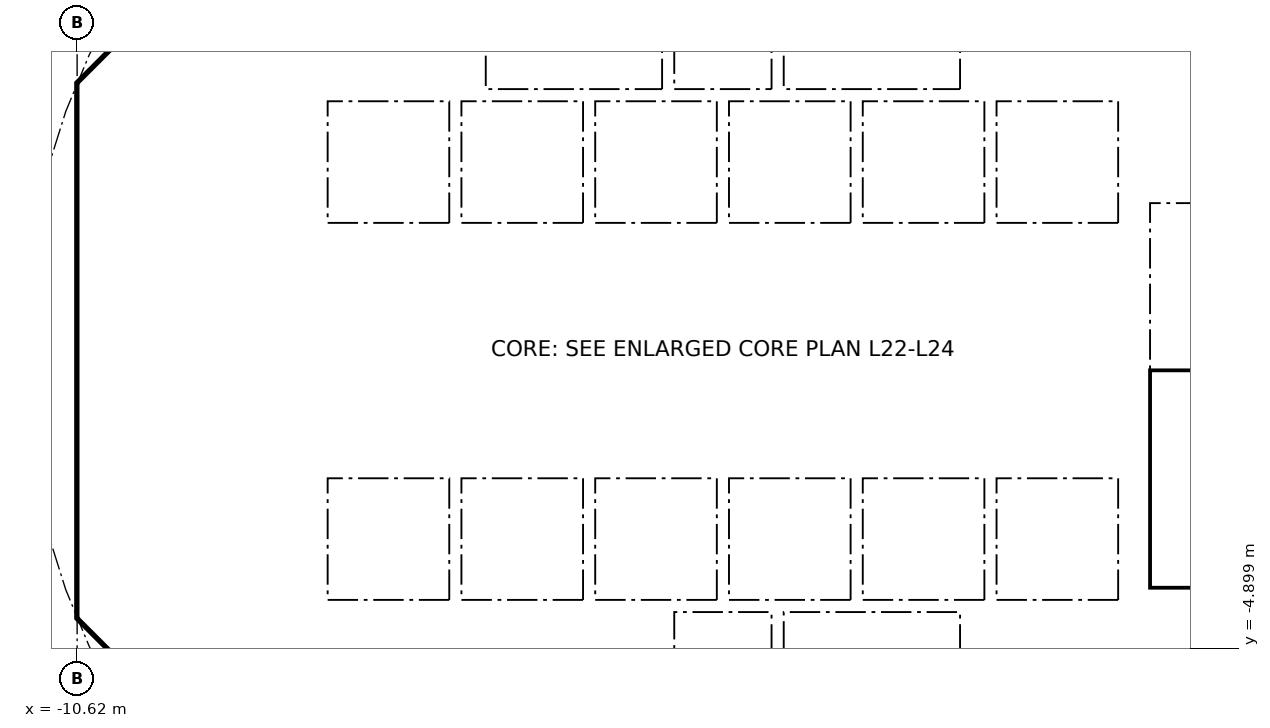
"""IFC4 building model, lengths in metres.
Left out: names, types, materials, properties, quantities, classifications, styles, units other than length and angle.
Written with IfcOpenShell. Run it as: python <this file> out.ifc"""

import sys

from ifc_helpers import new_model, si_unit, direction, frame, frame_2d, origin, place, context, subcontext, project, spatial, polyline, rectangle, outline, extrude, element, fill, save


model = new_model("IFC4")
c1 = context("Model", 3, precision=1e-05, world=origin(), true_north=direction((0.0, 1.0)))
c2 = subcontext(c1, "Body", "Model", "MODEL_VIEW")
j1 = project(units=[si_unit("LENGTHUNIT", "METRE"), si_unit("PLANEANGLEUNIT", "RADIAN")], contexts=[c1])
p1 = place(None, origin())
s1 = spatial("IfcSite", under=j1, at=p1, CompositionType="ELEMENT")
p2 = place(p1, origin())
s2 = spatial("IfcBuilding", under=s1, at=p2, CompositionType="ELEMENT")
p3 = place(p2, frame((0.0, 0.0, 95.5)))
s3 = spatial("IfcBuildingStorey", under=s2, at=p3, CompositionType="ELEMENT", Elevation=95.5)
p4 = place(p3, frame((9.988, 4.613, 0.0), z_axis=(0.0, 0.0, 1.0), x_axis=(-0.707106781187, 0.707106781187, 0.0)))
e1 = element("IfcWall", 1, at=p4, inside=s3, PredefinedType="SHEAR", context=c2, shape_type="SweptSolid", body=[
    extrude(rectangle(XDim=7.602, YDim=0.6, at=frame_2d((3.801, 0.0))), origin(), (0.0, 0.0, 1.0), 3.44),
])
p5 = place(p4, frame((3.201, 0.0, 0.0)))
e2 = element("IfcOpeningElement", 2, at=p5, cuts=e1, PredefinedType="OPENING", context=c2, shape_type="SweptSolid", body=[
    extrude(rectangle(XDim=1.2, YDim=2.1, at=frame_2d((0.6, 1.05))), frame((0.0, 0.31, 0.0), z_axis=(0.0, -1.0, 0.0), x_axis=(1.0, 0.0, 0.0)), (0.0, 0.0, 1.0), 0.62),
])
p6 = place(p3, frame((-4.613, 9.988, 0.0), z_axis=(0.0, 0.0, 1.0), x_axis=(-0.707106781187, -0.707106781187, 0.0)))
e3 = element("IfcWall", 3, at=p6, inside=s3, PredefinedType="SHEAR", context=c2, shape_type="SweptSolid", body=[
    extrude(rectangle(XDim=7.602, YDim=0.6, at=frame_2d((3.801, 0.0))), origin(), (0.0, 0.0, 1.0), 3.44),
])
p7 = place(p6, frame((0.351, 0.0, 0.0)))
e4 = element("IfcOpeningElement", 4, at=p7, cuts=e3, PredefinedType="OPENING", context=c2, shape_type="SweptSolid", body=[
    extrude(rectangle(XDim=1.1, YDim=2.1, at=frame_2d((0.55, 1.05))), frame((0.0, 0.31, 0.0), z_axis=(0.0, -1.0, 0.0), x_axis=(1.0, 0.0, 0.0)), (0.0, 0.0, 1.0), 0.62),
])
p8 = place(p3, frame((-10.325, 3.801, 0.0), z_axis=(0.0, 0.0, 1.0), x_axis=(0.0, -1.0, 0.0)))
e5 = element("IfcWall", 5, at=p8, inside=s3, PredefinedType="SHEAR", context=c2, shape_type="SweptSolid", body=[
    extrude(rectangle(XDim=7.602, YDim=0.6, at=frame_2d((3.801, 0.0))), origin(), (0.0, 0.0, 1.0), 3.44),
])
p9 = place(p8, frame((0.651, 0.0, 0.0)))
e6 = element("IfcOpeningElement", 6, at=p9, cuts=e5, PredefinedType="OPENING", context=c2, shape_type="SweptSolid", body=[
    extrude(rectangle(XDim=1.5, YDim=2.1, at=frame_2d((0.75, 1.05))), frame((0.0, 0.31, 0.0), z_axis=(0.0, -1.0, 0.0), x_axis=(1.0, 0.0, 0.0)), (0.0, 0.0, 1.0), 0.62),
])
p10 = place(p8, frame((5.451, 0.0, 0.0)))
e7 = element("IfcOpeningElement", 7, at=p10, cuts=e5, PredefinedType="OPENING", context=c2, shape_type="SweptSolid", body=[
    extrude(rectangle(XDim=1.5, YDim=2.1, at=frame_2d((0.75, 1.05))), frame((0.0, 0.31, 0.0), z_axis=(0.0, -1.0, 0.0), x_axis=(1.0, 0.0, 0.0)), (0.0, 0.0, 1.0), 0.62),
])
p11 = place(p3, frame((-9.988, -4.613, 0.0), z_axis=(0.0, 0.0, 1.0), x_axis=(0.707106781187, -0.707106781187, 0.0)))
e8 = element("IfcWall", 8, at=p11, inside=s3, PredefinedType="SHEAR", context=c2, shape_type="SweptSolid", body=[
    extrude(rectangle(XDim=7.602, YDim=0.6, at=frame_2d((3.801, 0.0))), origin(), (0.0, 0.0, 1.0), 3.44),
])
p12 = place(p11, frame((6.151, 0.0, 0.0)))
e9 = element("IfcOpeningElement", 9, at=p12, cuts=e8, PredefinedType="OPENING", context=c2, shape_type="SweptSolid", body=[
    extrude(rectangle(XDim=1.1, YDim=2.1, at=frame_2d((0.55, 1.05))), frame((0.0, 0.31, 0.0), z_axis=(0.0, -1.0, 0.0), x_axis=(1.0, 0.0, 0.0)), (0.0, 0.0, 1.0), 0.62),
])
p13 = place(p3, frame((4.613, -9.988, 0.0), z_axis=(0.0, 0.0, 1.0), x_axis=(0.707106781187, 0.707106781187, 0.0)))
e10 = element("IfcWall", 10, at=p13, inside=s3, PredefinedType="SHEAR", context=c2, shape_type="SweptSolid", body=[
    extrude(rectangle(XDim=7.602, YDim=0.6, at=frame_2d((3.801, 0.0))), origin(), (0.0, 0.0, 1.0), 3.44),
])
p14 = place(p13, frame((3.201, 0.0, 0.0)))
e11 = element("IfcOpeningElement", 11, at=p14, cuts=e10, PredefinedType="OPENING", context=c2, shape_type="SweptSolid", body=[
    extrude(rectangle(XDim=1.2, YDim=2.1, at=frame_2d((0.6, 1.05))), frame((0.0, 0.31, 0.0), z_axis=(0.0, -1.0, 0.0), x_axis=(1.0, 0.0, 0.0)), (0.0, 0.0, 1.0), 0.62),
])
p15 = place(p3, frame((-7.0, 4.1, 0.0), z_axis=(0.0, 0.0, 1.0), x_axis=(0.0, 1.0, 0.0)))
e12 = element("IfcWall", 12, at=p15, inside=s3, PredefinedType="PARTITIONING", context=c2, shape_type="SweptSolid", body=[
    extrude(rectangle(XDim=2.927, YDim=0.15, at=frame_2d((1.463, 0.0))), origin(), (0.0, 0.0, 1.0), 3.44),
])
p16 = place(p15, frame((1.051, 0.0, 0.0)))
e13 = element("IfcOpeningElement", 13, at=p16, cuts=e12, PredefinedType="OPENING", context=c2, shape_type="SweptSolid", body=[
    extrude(rectangle(XDim=0.9, YDim=2.1, at=frame_2d((0.45, 1.05))), frame((0.0, 0.085, 0.0), z_axis=(0.0, -1.0, 0.0), x_axis=(1.0, 0.0, 0.0)), (0.0, 0.0, 1.0), 0.17),
])
p17 = place(p3, frame((4.0, 4.3, 0.0), z_axis=(0.0, 0.0, 1.0), x_axis=(0.0, 1.0, 0.0)))
e14 = element("IfcWall", 14, at=p17, inside=s3, PredefinedType="SOLIDWALL", context=c2, shape_type="SweptSolid", body=[
    extrude(rectangle(XDim=2.2, YDim=0.2, at=frame_2d((1.1, 0.0))), origin(), (0.0, 0.0, 1.0), 3.44),
])
p18 = place(p17, frame((0.55, 0.0, 0.0)))
e15 = element("IfcOpeningElement", 15, at=p18, cuts=e14, PredefinedType="OPENING", context=c2, shape_type="SweptSolid", body=[
    extrude(rectangle(XDim=1.1, YDim=2.1, at=frame_2d((0.55, 1.05))), frame((0.0, 0.11, 0.0), z_axis=(0.0, -1.0, 0.0), x_axis=(1.0, 0.0, 0.0)), (0.0, 0.0, 1.0), 0.22),
])
p19 = place(p3, frame((-4.0, 4.3, 0.0), z_axis=(0.0, 0.0, 1.0), x_axis=(0.0, 1.0, 0.0)))
e16 = element("IfcWall", 16, at=p19, inside=s3, PredefinedType="SOLIDWALL", context=c2, shape_type="SweptSolid", body=[
    extrude(rectangle(XDim=2.2, YDim=0.2, at=frame_2d((1.1, 0.0))), origin(), (0.0, 0.0, 1.0), 3.44),
])
p20 = place(p19, frame((0.55, 0.0, 0.0)))
e17 = element("IfcOpeningElement", 17, at=p20, cuts=e16, PredefinedType="OPENING", context=c2, shape_type="SweptSolid", body=[
    extrude(rectangle(XDim=1.1, YDim=2.1, at=frame_2d((0.55, 1.05))), frame((0.0, 0.11, 0.0), z_axis=(0.0, -1.0, 0.0), x_axis=(1.0, 0.0, 0.0)), (0.0, 0.0, 1.0), 0.22),
])
p21 = place(p3, frame((-6.7, 2.0, 0.0), z_axis=(0.0, 0.0, 1.0), x_axis=(1.0, 0.0, 0.0)))
e18 = element("IfcWall", 18, at=p21, inside=s3, PredefinedType="SOLIDWALL", context=c2, shape_type="SweptSolid", body=[
    extrude(rectangle(XDim=13.4, YDim=0.2, at=frame_2d((6.7, 0.0))), origin(), (0.0, 0.0, 1.0), 3.44),
])
p22 = place(p21, frame((0.65, 0.0, 0.0)))
e19 = element("IfcOpeningElement", 19, at=p22, cuts=e18, PredefinedType="OPENING", context=c2, shape_type="SweptSolid", body=[
    extrude(rectangle(XDim=1.1, YDim=2.1, at=frame_2d((0.55, 1.05))), frame((0.0, 0.11, 0.0), z_axis=(0.0, -1.0, 0.0), x_axis=(1.0, 0.0, 0.0)), (0.0, 0.0, 1.0), 0.22),
])
p23 = place(p21, frame((2.85, 0.0, 0.0)))
e20 = element("IfcOpeningElement", 20, at=p23, cuts=e18, PredefinedType="OPENING", context=c2, shape_type="SweptSolid", body=[
    extrude(rectangle(XDim=1.1, YDim=2.1, at=frame_2d((0.55, 1.05))), frame((0.0, 0.11, 0.0), z_axis=(0.0, -1.0, 0.0), x_axis=(1.0, 0.0, 0.0)), (0.0, 0.0, 1.0), 0.22),
])
p24 = place(p21, frame((5.05, 0.0, 0.0)))
e21 = element("IfcOpeningElement", 21, at=p24, cuts=e18, PredefinedType="OPENING", context=c2, shape_type="SweptSolid", body=[
    extrude(rectangle(XDim=1.1, YDim=2.1, at=frame_2d((0.55, 1.05))), frame((0.0, 0.11, 0.0), z_axis=(0.0, -1.0, 0.0), x_axis=(1.0, 0.0, 0.0)), (0.0, 0.0, 1.0), 0.22),
])
p25 = place(p3, frame((6.7, 4.0, 0.0), z_axis=(0.0, 0.0, 1.0), x_axis=(1.0, 0.0, 0.0)))
e22 = element("IfcWall", 22, at=p25, inside=s3, PredefinedType="SOLIDWALL", context=c2, shape_type="SweptSolid", body=[
    extrude(rectangle(XDim=3.325, YDim=0.2, at=frame_2d((1.662, 0.0))), origin(), (0.0, 0.0, 1.0), 3.44),
])
p26 = place(p25, frame((1.25, 0.0, 0.0)))
e23 = element("IfcOpeningElement", 23, at=p26, cuts=e22, PredefinedType="OPENING", context=c2, shape_type="SweptSolid", body=[
    extrude(rectangle(XDim=1.1, YDim=2.1, at=frame_2d((0.55, 1.05))), frame((0.0, 0.11, 0.0), z_axis=(0.0, -1.0, 0.0), x_axis=(1.0, 0.0, 0.0)), (0.0, 0.0, 1.0), 0.22),
])
p27 = place(p3, frame((-7.4, -6.627, 0.0), z_axis=(0.0, 0.0, 1.0), x_axis=(0.0, 1.0, 0.0)))
e24 = element("IfcWall", 24, at=p27, inside=s3, PredefinedType="PARTITIONING", context=c2, shape_type="SweptSolid", body=[
    extrude(rectangle(XDim=2.527, YDim=0.15, at=frame_2d((1.263, 0.0))), origin(), (0.0, 0.0, 1.0), 3.44),
])
p28 = place(p27, frame((0.776, 0.0, 0.0)))
e25 = element("IfcOpeningElement", 25, at=p28, cuts=e24, PredefinedType="OPENING", context=c2, shape_type="SweptSolid", body=[
    extrude(rectangle(XDim=0.9, YDim=2.1, at=frame_2d((0.45, 1.05))), frame((0.0, 0.085, 0.0), z_axis=(0.0, -1.0, 0.0), x_axis=(1.0, 0.0, 0.0)), (0.0, 0.0, 1.0), 0.17),
])
p29 = place(p3, frame((4.0, -6.5, 0.0), z_axis=(0.0, 0.0, 1.0), x_axis=(0.0, 1.0, 0.0)))
e26 = element("IfcWall", 26, at=p29, inside=s3, PredefinedType="SOLIDWALL", context=c2, shape_type="SweptSolid", body=[
    extrude(rectangle(XDim=2.2, YDim=0.2, at=frame_2d((1.1, 0.0))), origin(), (0.0, 0.0, 1.0), 3.44),
])
p30 = place(p29, frame((0.55, 0.0, 0.0)))
e27 = element("IfcOpeningElement", 27, at=p30, cuts=e26, PredefinedType="OPENING", context=c2, shape_type="SweptSolid", body=[
    extrude(rectangle(XDim=1.1, YDim=2.1, at=frame_2d((0.55, 1.05))), frame((0.0, 0.11, 0.0), z_axis=(0.0, -1.0, 0.0), x_axis=(1.0, 0.0, 0.0)), (0.0, 0.0, 1.0), 0.22),
])
p31 = place(p3, frame((-4.0, -6.5, 0.0), z_axis=(0.0, 0.0, 1.0), x_axis=(0.0, 1.0, 0.0)))
e28 = element("IfcWall", 28, at=p31, inside=s3, PredefinedType="SOLIDWALL", context=c2, shape_type="SweptSolid", body=[
    extrude(rectangle(XDim=2.2, YDim=0.2, at=frame_2d((1.1, 0.0))), origin(), (0.0, 0.0, 1.0), 3.44),
])
p32 = place(p31, frame((0.65, 0.0, 0.0)))
e29 = element("IfcOpeningElement", 29, at=p32, cuts=e28, PredefinedType="OPENING", context=c2, shape_type="SweptSolid", body=[
    extrude(rectangle(XDim=0.9, YDim=2.1, at=frame_2d((0.45, 1.05))), frame((0.0, 0.11, 0.0), z_axis=(0.0, -1.0, 0.0), x_axis=(1.0, 0.0, 0.0)), (0.0, 0.0, 1.0), 0.22),
])
p33 = place(p3, frame((-6.7, -2.0, 0.0), z_axis=(0.0, 0.0, 1.0), x_axis=(1.0, 0.0, 0.0)))
e30 = element("IfcWall", 30, at=p33, inside=s3, PredefinedType="SOLIDWALL", context=c2, shape_type="SweptSolid", body=[
    extrude(rectangle(XDim=13.4, YDim=0.2, at=frame_2d((6.7, 0.0))), origin(), (0.0, 0.0, 1.0), 3.44),
])
p34 = place(p33, frame((0.65, 0.0, 0.0)))
e31 = element("IfcOpeningElement", 31, at=p34, cuts=e30, PredefinedType="OPENING", context=c2, shape_type="SweptSolid", body=[
    extrude(rectangle(XDim=1.1, YDim=2.1, at=frame_2d((0.55, 1.05))), frame((0.0, 0.11, 0.0), z_axis=(0.0, -1.0, 0.0), x_axis=(1.0, 0.0, 0.0)), (0.0, 0.0, 1.0), 0.22),
])
p35 = place(p33, frame((2.85, 0.0, 0.0)))
e32 = element("IfcOpeningElement", 32, at=p35, cuts=e30, PredefinedType="OPENING", context=c2, shape_type="SweptSolid", body=[
    extrude(rectangle(XDim=1.1, YDim=2.1, at=frame_2d((0.55, 1.05))), frame((0.0, 0.11, 0.0), z_axis=(0.0, -1.0, 0.0), x_axis=(1.0, 0.0, 0.0)), (0.0, 0.0, 1.0), 0.22),
])
p36 = place(p3, origin())
e33 = element("IfcWall", 33, at=p36, inside=s3, PredefinedType="SHEAR", context=c2, shape_type="SweptSolid", body=[
    extrude(outline(polyline([(-10.625, -3.801), (-10.025, -3.801), (-10.025, -4.152), (-9.776, -4.401), (-10.2, -4.825), (-10.625, -4.401), (-10.625, -3.801)])), origin(), (0.0, 0.0, 1.0), 3.44),
])
p37 = place(p3, origin())
e34 = element("IfcWall", 34, at=p37, inside=s3, PredefinedType="SHEAR", context=c2, shape_type="SweptSolid", body=[
    extrude(outline(polyline([(-10.2, 4.825), (-9.776, 4.401), (-10.025, 4.152), (-10.025, 3.801), (-10.625, 3.801), (-10.625, 4.401), (-10.2, 4.825)])), origin(), (0.0, 0.0, 1.0), 3.44),
])
for number, where, z_axis, x_axis in (
    (35, (-0.9, -6.5, 0.0), (0.0, 0.0, 1.0), (0.0, 1.0, 0.0)),
    (36, (0.9, -6.5, 0.0), (0.0, 0.0, 1.0), (0.0, 1.0, 0.0)),
):
    element("IfcWall", number, at=place(p3, frame(where, z_axis=z_axis, x_axis=x_axis)), inside=s3, PredefinedType="SOLIDWALL", context=c2, shape_type="SweptSolid", body=[
        extrude(rectangle(XDim=2.2, YDim=0.2, at=frame_2d((1.1, 0.0))), origin(), (0.0, 0.0, 1.0), 3.44),
    ])
p38 = place(p3, origin())
e37 = element("IfcWall", 37, at=p38, inside=s3, PredefinedType="SOLIDWALL", context=c2, shape_type="SweptSolid", body=[
    extrude(outline(polyline([(-6.7, -2.1), (-6.5, -2.1), (-6.5, -4.1), (-4.5, -4.1), (-4.5, -2.1), (-4.3, -2.1), (-4.3, -4.1), (-2.3, -4.1), (-2.3, -2.1), (-2.1, -2.1), (-2.1, -4.1), (-0.1, -4.1), (-0.1, -2.1), (0.1, -2.1), (0.1, -4.1), (2.1, -4.1), (2.1, -2.1), (2.3, -2.1), (2.3, -4.1), (4.3, -4.1), (4.3, -2.1), (4.5, -2.1), (4.5, -4.1), (6.5, -4.1), (6.5, -2.1), (6.7, -2.1), (6.7, -4.3), (-6.7, -4.3), (-6.7, -2.1)])), origin(), (0.0, 0.0, 1.0), 3.44),
])
for number, where, z_axis, x_axis in (
    (38, (-0.9, 4.3, 0.0), (0.0, 0.0, 1.0), (0.0, 1.0, 0.0)),
    (39, (0.9, 4.3, 0.0), (0.0, 0.0, 1.0), (0.0, 1.0, 0.0)),
):
    element("IfcWall", number, at=place(p3, frame(where, z_axis=z_axis, x_axis=x_axis)), inside=s3, PredefinedType="SOLIDWALL", context=c2, shape_type="SweptSolid", body=[
        extrude(rectangle(XDim=2.2, YDim=0.2, at=frame_2d((1.1, 0.0))), origin(), (0.0, 0.0, 1.0), 3.44),
    ])
p39 = place(p3, origin())
e40 = element("IfcWall", 40, at=p39, inside=s3, PredefinedType="SOLIDWALL", context=c2, shape_type="SweptSolid", body=[
    extrude(outline(polyline([(-6.5, 2.1), (-6.7, 2.1), (-6.7, 4.3), (6.7, 4.3), (6.7, 2.1), (6.5, 2.1), (6.5, 4.1), (4.5, 4.1), (4.5, 2.1), (4.3, 2.1), (4.3, 4.1), (2.3, 4.1), (2.3, 2.1), (2.1, 2.1), (2.1, 4.1), (0.1, 4.1), (0.1, 2.1), (-0.1, 2.1), (-0.1, 4.1), (-2.1, 4.1), (-2.1, 2.1), (-2.3, 2.1), (-2.3, 4.1), (-4.3, 4.1), (-4.3, 2.1), (-4.5, 2.1), (-4.5, 4.1), (-6.5, 4.1), (-6.5, 2.1)])), origin(), (0.0, 0.0, 1.0), 3.44),
])
for number, where, z_axis, x_axis in (
    (41, (-10.025, -4.0, 0.0), (0.0, 0.0, 1.0), (1.0, 0.0, 0.0)),
    (42, (-10.025, 4.0, 0.0), (0.0, 0.0, 1.0), (1.0, 0.0, 0.0)),
):
    element("IfcWall", number, at=place(p3, frame(where, z_axis=z_axis, x_axis=x_axis)), inside=s3, PredefinedType="PARTITIONING", context=c2, shape_type="SweptSolid", body=[
        extrude(rectangle(XDim=3.325, YDim=0.2, at=frame_2d((1.662, 0.0))), origin(), (0.0, 0.0, 1.0), 3.44),
    ])
p40 = place(p3, origin())
e43 = element("IfcWall", 43, at=p40, inside=s3, PredefinedType="SOLIDWALL", context=c2, shape_type="SweptSolid", body=[
    extrude(outline(polyline([(7.025, -3.9), (6.7, -3.9), (6.7, 3.9), (7.025, 3.9), (7.025, -3.9)])), origin(), (0.0, 0.0, 1.0), 3.44),
])
p41 = place(p3, origin())
e44 = element("IfcWall", 44, at=p41, inside=s3, PredefinedType="SOLIDWALL", context=c2, shape_type="SweptSolid", body=[
    extrude(outline(polyline([(10.025, -4.1), (6.7, -4.1), (6.7, -3.9), (10.025, -3.9), (10.025, -4.1)])), origin(), (0.0, 0.0, 1.0), 3.44),
])
p42 = place(p22, origin())
e45 = element("IfcDoor", 45, at=p42, inside=s3, OperationType="DOUBLE_DOOR_SLIDING", PredefinedType="DOOR", context=c2, shape_type="SweptSolid", body=[
    extrude(rectangle(XDim=1.1, YDim=2.1, at=frame_2d((0.55, 1.05))), frame((0.0, 0.025, 0.0), z_axis=(0.0, -1.0, 0.0), x_axis=(1.0, 0.0, 0.0)), (0.0, 0.0, 1.0), 0.05),
])
fill(e19, e45)
p43 = place(p23, origin())
e46 = element("IfcDoor", 46, at=p43, inside=s3, OperationType="DOUBLE_DOOR_SLIDING", PredefinedType="DOOR", context=c2, shape_type="SweptSolid", body=[
    extrude(rectangle(XDim=1.1, YDim=2.1, at=frame_2d((0.55, 1.05))), frame((0.0, 0.025, 0.0), z_axis=(0.0, -1.0, 0.0), x_axis=(1.0, 0.0, 0.0)), (0.0, 0.0, 1.0), 0.05),
])
fill(e20, e46)
p44 = place(p24, origin())
e47 = element("IfcDoor", 47, at=p44, inside=s3, OperationType="DOUBLE_DOOR_SLIDING", PredefinedType="DOOR", context=c2, shape_type="SweptSolid", body=[
    extrude(rectangle(XDim=1.1, YDim=2.1, at=frame_2d((0.55, 1.05))), frame((0.0, 0.025, 0.0), z_axis=(0.0, -1.0, 0.0), x_axis=(1.0, 0.0, 0.0)), (0.0, 0.0, 1.0), 0.05),
])
fill(e21, e47)
p45 = place(p34, origin())
e48 = element("IfcDoor", 48, at=p45, inside=s3, OperationType="DOUBLE_DOOR_SLIDING", PredefinedType="DOOR", context=c2, shape_type="SweptSolid", body=[
    extrude(rectangle(XDim=1.1, YDim=2.1, at=frame_2d((0.55, 1.05))), frame((0.0, 0.025, 0.0), z_axis=(0.0, -1.0, 0.0), x_axis=(1.0, 0.0, 0.0)), (0.0, 0.0, 1.0), 0.05),
])
fill(e31, e48)
p46 = place(p35, origin())
e49 = element("IfcDoor", 49, at=p46, inside=s3, OperationType="DOUBLE_DOOR_SLIDING", PredefinedType="DOOR", context=c2, shape_type="SweptSolid", body=[
    extrude(rectangle(XDim=1.1, YDim=2.1, at=frame_2d((0.55, 1.05))), frame((0.0, 0.025, 0.0), z_axis=(0.0, -1.0, 0.0), x_axis=(1.0, 0.0, 0.0)), (0.0, 0.0, 1.0), 0.05),
])
fill(e32, e49)
p47 = place(p18, origin())
e50 = element("IfcDoor", 50, at=p47, inside=s3, OperationType="DOUBLE_DOOR_SLIDING", PredefinedType="DOOR", context=c2, shape_type="SweptSolid", body=[
    extrude(rectangle(XDim=1.1, YDim=2.1, at=frame_2d((0.55, 1.05))), frame((0.0, 0.025, 0.0), z_axis=(0.0, -1.0, 0.0), x_axis=(1.0, 0.0, 0.0)), (0.0, 0.0, 1.0), 0.05),
])
fill(e15, e50)
p48 = place(p30, origin())
e51 = element("IfcDoor", 51, at=p48, inside=s3, OperationType="DOUBLE_DOOR_SLIDING", PredefinedType="DOOR", context=c2, shape_type="SweptSolid", body=[
    extrude(rectangle(XDim=1.1, YDim=2.1, at=frame_2d((0.55, 1.05))), frame((0.0, 0.025, 0.0), z_axis=(0.0, -1.0, 0.0), x_axis=(1.0, 0.0, 0.0)), (0.0, 0.0, 1.0), 0.05),
])
fill(e27, e51)
p49 = place(p20, origin())
e52 = element("IfcDoor", 52, at=p49, inside=s3, OperationType="DOUBLE_DOOR_SLIDING", PredefinedType="DOOR", context=c2, shape_type="SweptSolid", body=[
    extrude(rectangle(XDim=1.1, YDim=2.1, at=frame_2d((0.55, 1.05))), frame((0.0, 0.025, 0.0), z_axis=(0.0, -1.0, 0.0), x_axis=(1.0, 0.0, 0.0)), (0.0, 0.0, 1.0), 0.05),
])
fill(e17, e52)
p50 = place(p9, origin())
e53 = element("IfcDoor", 53, at=p50, inside=s3, OperationType="DOUBLE_DOOR_SINGLE_SWING", PredefinedType="DOOR", context=c2, shape_type="SweptSolid", body=[
    extrude(rectangle(XDim=1.5, YDim=2.1, at=frame_2d((0.75, 1.05))), frame((0.0, 0.025, 0.0), z_axis=(0.0, -1.0, 0.0), x_axis=(1.0, 0.0, 0.0)), (0.0, 0.0, 1.0), 0.05),
])
fill(e6, e53)
p51 = place(p10, origin())
e54 = element("IfcDoor", 54, at=p51, inside=s3, OperationType="DOUBLE_DOOR_SINGLE_SWING", PredefinedType="DOOR", context=c2, shape_type="SweptSolid", body=[
    extrude(rectangle(XDim=1.5, YDim=2.1, at=frame_2d((0.75, 1.05))), frame((0.0, 0.025, 0.0), z_axis=(0.0, -1.0, 0.0), x_axis=(1.0, 0.0, 0.0)), (0.0, 0.0, 1.0), 0.05),
])
fill(e7, e54)
save(model, sys.argv[1])
